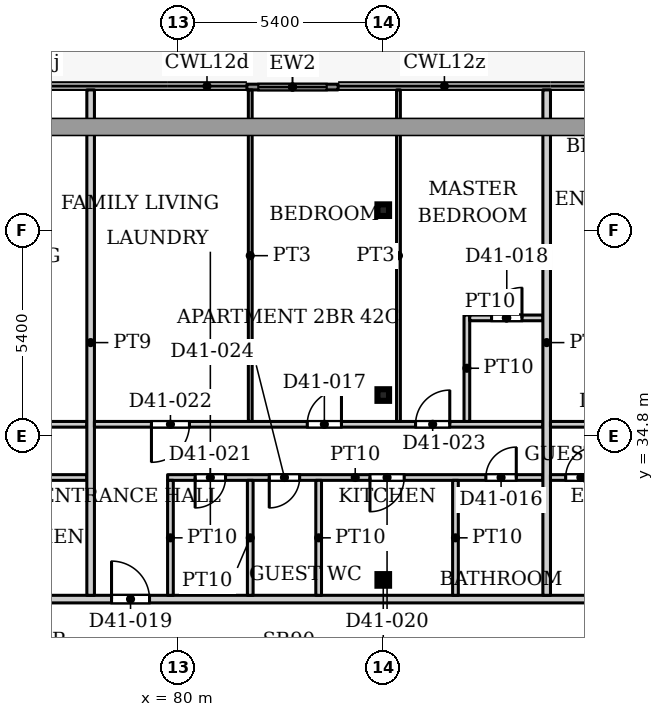
"""IFC4 building model, lengths in metres.
Left out: names, types, materials, properties, quantities, classifications, styles, units other than length and angle.
Written with IfcOpenShell. Run it as: python <this file> out.ifc"""

import sys

from ifc_helpers import new_model, si_unit, direction, frame, frame_2d, origin, origin_2d, place, context, subcontext, project, spatial, rectangle, hollow_rectangle, extrude, source, transform, mapped, element, fill, save


model = new_model("IFC4")
c1 = context("Model", 3, precision=1e-05, world=origin(), true_north=direction((0.0, 1.0)))
c2 = subcontext(c1, "Body", "Model", "MODEL_VIEW")
j1 = project(units=[si_unit("LENGTHUNIT", "METRE"), si_unit("PLANEANGLEUNIT", "RADIAN")], contexts=[c1])
p1 = place(None, origin())
s1 = spatial("IfcSite", under=j1, at=p1, CompositionType="ELEMENT")
p2 = place(p1, origin())
s2 = spatial("IfcBuilding", under=s1, at=p2, CompositionType="ELEMENT")
p3 = place(p2, frame((0.0, 0.0, 179.9)))
s3 = spatial("IfcBuildingStorey", under=s2, at=p3, CompositionType="ELEMENT", Elevation=179.9)
for number, where, z_axis, x_axis in (
    (1, (85.4, 31.005, 0.0), (0.0, 0.0, 1.0), (1.0, 0.0, 0.0)),
    (2, (85.4, 35.87, 0.0), (0.0, 0.0, 1.0), (1.0, 0.0, 0.0)),
    (3, (85.4, 40.735, 0.0), (0.0, 0.0, 1.0), (1.0, 0.0, 0.0)),
):
    element("IfcColumn", number, at=place(p3, frame(where, z_axis=z_axis, x_axis=x_axis)), inside=s3, PredefinedType="COLUMN", context=c2, shape_type="SweptSolid", body=[
        extrude(hollow_rectangle(XDim=0.305, YDim=0.305, WallThickness=0.016, InnerFilletRadius=0.016, OuterFilletRadius=0.032, at=origin_2d()), origin(), (0.0, 0.0, 1.0), 3.9),
    ])
p4 = place(p3, frame((81.812, 43.975, 0.0), z_axis=(0.0, 0.0, 1.0), x_axis=(1.0, 0.0, 0.0)))
e4 = element("IfcWall", 4, at=p4, inside=s3, PredefinedType="SOLIDWALL", context=c2, shape_type="SweptSolid", body=[
    extrude(rectangle(XDim=2.4, YDim=0.15, at=frame_2d((1.2, 0.0))), origin(), (0.0, 0.0, 1.0), 3.75),
])
p5 = place(p4, frame((0.3, 0.0, 0.0)))
e5 = element("IfcOpeningElement", 5, at=p5, cuts=e4, PredefinedType="OPENING", context=c2, shape_type="SweptSolid", body=[
    extrude(rectangle(XDim=1.8, YDim=2.4, at=frame_2d((0.9, 1.2))), frame((0.0, 0.085, 0.0), z_axis=(0.0, -1.0, 0.0), x_axis=(1.0, 0.0, 0.0)), (0.0, 0.0, 1.0), 0.17),
])
p6 = place(p3, frame((53.549, 30.5, 0.0), z_axis=(0.0, 0.0, 1.0), x_axis=(1.0, 0.0, 0.0)))
e6 = element("IfcWall", 6, at=p6, inside=s3, PredefinedType="PARTITIONING", context=c2, shape_type="SweptSolid", body=[
    extrude(rectangle(XDim=44.551, YDim=0.2, at=frame_2d((22.275, 0.0))), origin(), (0.0, 0.0, 1.0), 3.6),
])
p7 = place(p6, frame((6.851, 0.0, 0.0)))
e7 = element("IfcOpeningElement", 7, at=p7, cuts=e6, PredefinedType="OPENING", context=c2, shape_type="SweptSolid", body=[
    extrude(rectangle(XDim=1.0, YDim=2.1, at=frame_2d((0.5, 1.05))), frame((0.0, 0.11, 0.0), z_axis=(0.0, -1.0, 0.0), x_axis=(1.0, 0.0, 0.0)), (0.0, 0.0, 1.0), 0.22),
])
p8 = place(p6, frame((13.451, 0.0, 0.0)))
e8 = element("IfcOpeningElement", 8, at=p8, cuts=e6, PredefinedType="OPENING", context=c2, shape_type="SweptSolid", body=[
    extrude(rectangle(XDim=1.0, YDim=2.1, at=frame_2d((0.5, 1.05))), frame((0.0, 0.11, 0.0), z_axis=(0.0, -1.0, 0.0), x_axis=(1.0, 0.0, 0.0)), (0.0, 0.0, 1.0), 0.22),
])
p9 = place(p6, frame((24.701, 0.0, 0.0)))
e9 = element("IfcOpeningElement", 9, at=p9, cuts=e6, PredefinedType="OPENING", context=c2, shape_type="SweptSolid", body=[
    extrude(rectangle(XDim=1.0, YDim=2.1, at=frame_2d((0.5, 1.05))), frame((0.0, 0.11, 0.0), z_axis=(0.0, -1.0, 0.0), x_axis=(1.0, 0.0, 0.0)), (0.0, 0.0, 1.0), 0.22),
])
p10 = place(p6, frame((38.651, 0.0, 0.0)))
e10 = element("IfcOpeningElement", 10, at=p10, cuts=e6, PredefinedType="OPENING", context=c2, shape_type="SweptSolid", body=[
    extrude(rectangle(XDim=1.0, YDim=2.1, at=frame_2d((0.5, 1.05))), frame((0.0, 0.11, 0.0), z_axis=(0.0, -1.0, 0.0), x_axis=(1.0, 0.0, 0.0)), (0.0, 0.0, 1.0), 0.22),
])
p11 = place(p3, frame((63.4, 35.1, 0.0), z_axis=(0.0, 0.0, 1.0), x_axis=(1.0, 0.0, 0.0)))
e11 = element("IfcWall", 11, at=p11, inside=s3, PredefinedType="PARTITIONING", context=c2, shape_type="SweptSolid", body=[
    extrude(rectangle(XDim=14.2, YDim=0.15, at=frame_2d((7.1, 0.0))), origin(), (0.0, 0.0, 1.0), 3.6),
])
p12 = place(p11, frame((1.4, 0.0, 0.0)))
e12 = element("IfcOpeningElement", 12, at=p12, cuts=e11, PredefinedType="OPENING", context=c2, shape_type="SweptSolid", body=[
    extrude(rectangle(XDim=0.9, YDim=2.1, at=frame_2d((0.45, 1.05))), frame((0.0, 0.085, 0.0), z_axis=(0.0, -1.0, 0.0), x_axis=(1.0, 0.0, 0.0)), (0.0, 0.0, 1.0), 0.17),
])
p13 = place(p11, frame((10.95, 0.0, 0.0)))
e13 = element("IfcOpeningElement", 13, at=p13, cuts=e11, PredefinedType="OPENING", context=c2, shape_type="SweptSolid", body=[
    extrude(rectangle(XDim=1.0, YDim=2.1, at=frame_2d((0.5, 1.05))), frame((0.0, 0.085, 0.0), z_axis=(0.0, -1.0, 0.0), x_axis=(1.0, 0.0, 0.0)), (0.0, 0.0, 1.0), 0.17),
])
p14 = place(p11, frame((6.8, 0.0, 0.0)))
e14 = element("IfcOpeningElement", 14, at=p14, cuts=e11, PredefinedType="OPENING", context=c2, shape_type="SweptSolid", body=[
    extrude(rectangle(XDim=0.9, YDim=2.1, at=frame_2d((0.45, 1.05))), frame((0.0, 0.085, 0.0), z_axis=(0.0, -1.0, 0.0), x_axis=(1.0, 0.0, 0.0)), (0.0, 0.0, 1.0), 0.17),
])
p15 = place(p3, frame((69.525, 33.7, 0.0), z_axis=(0.0, 0.0, 1.0), x_axis=(1.0, 0.0, 0.0)))
e15 = element("IfcWall", 15, at=p15, inside=s3, PredefinedType="PARTITIONING", context=c2, shape_type="SweptSolid", body=[
    extrude(rectangle(XDim=8.075, YDim=0.15, at=frame_2d((4.038, 0.0))), origin(), (0.0, 0.0, 1.0), 3.6),
])
p16 = place(p15, frame((4.625, 0.0, 0.0)))
e16 = element("IfcOpeningElement", 16, at=p16, cuts=e15, PredefinedType="OPENING", context=c2, shape_type="SweptSolid", body=[
    extrude(rectangle(XDim=0.9, YDim=2.1, at=frame_2d((0.45, 1.05))), frame((0.0, 0.085, 0.0), z_axis=(0.0, -1.0, 0.0), x_axis=(1.0, 0.0, 0.0)), (0.0, 0.0, 1.0), 0.17),
])
p17 = place(p15, frame((1.175, 0.0, 0.0)))
e17 = element("IfcOpeningElement", 17, at=p17, cuts=e15, PredefinedType="OPENING", context=c2, shape_type="SweptSolid", body=[
    extrude(rectangle(XDim=0.8, YDim=2.1, at=frame_2d((0.4, 1.05))), frame((0.0, 0.085, 0.0), z_axis=(0.0, -1.0, 0.0), x_axis=(1.0, 0.0, 0.0)), (0.0, 0.0, 1.0), 0.17),
])
p18 = place(p3, frame((77.7, 30.6, 0.0), z_axis=(0.0, 0.0, 1.0), x_axis=(0.0, 1.0, 0.0)))
e18 = element("IfcWall", 18, at=p18, inside=s3, PredefinedType="PARTITIONING", context=c2, shape_type="SweptSolid", body=[
    extrude(rectangle(XDim=13.3, YDim=0.2, at=frame_2d((6.65, 0.0))), origin(), (0.0, 0.0, 1.0), 3.6),
])
p19 = place(p3, frame((77.8, 35.1, 0.0), z_axis=(0.0, 0.0, 1.0), x_axis=(1.0, 0.0, 0.0)))
e19 = element("IfcWall", 19, at=p19, inside=s3, PredefinedType="PARTITIONING", context=c2, shape_type="SweptSolid", body=[
    extrude(rectangle(XDim=11.8, YDim=0.15, at=frame_2d((5.9, 0.0))), origin(), (0.0, 0.0, 1.0), 3.6),
])
p20 = place(p19, frame((5.6, 0.0, 0.0)))
e20 = element("IfcOpeningElement", 20, at=p20, cuts=e19, PredefinedType="OPENING", context=c2, shape_type="SweptSolid", body=[
    extrude(rectangle(XDim=0.9, YDim=2.1, at=frame_2d((0.45, 1.05))), frame((0.0, 0.085, 0.0), z_axis=(0.0, -1.0, 0.0), x_axis=(1.0, 0.0, 0.0)), (0.0, 0.0, 1.0), 0.17),
])
p21 = place(p19, frame((1.5, 0.0, 0.0)))
e21 = element("IfcOpeningElement", 21, at=p21, cuts=e19, PredefinedType="OPENING", context=c2, shape_type="SweptSolid", body=[
    extrude(rectangle(XDim=1.0, YDim=2.1, at=frame_2d((0.5, 1.05))), frame((0.0, 0.085, 0.0), z_axis=(0.0, -1.0, 0.0), x_axis=(1.0, 0.0, 0.0)), (0.0, 0.0, 1.0), 0.17),
])
p22 = place(p19, frame((8.45, 0.0, 0.0)))
e22 = element("IfcOpeningElement", 22, at=p22, cuts=e19, PredefinedType="OPENING", context=c2, shape_type="SweptSolid", body=[
    extrude(rectangle(XDim=0.9, YDim=2.1, at=frame_2d((0.45, 1.05))), frame((0.0, 0.085, 0.0), z_axis=(0.0, -1.0, 0.0), x_axis=(1.0, 0.0, 0.0)), (0.0, 0.0, 1.0), 0.17),
])
p23 = place(p3, frame((79.725, 33.7, 0.0), z_axis=(0.0, 0.0, 1.0), x_axis=(1.0, 0.0, 0.0)))
e23 = element("IfcWall", 23, at=p23, inside=s3, PredefinedType="PARTITIONING", context=c2, shape_type="SweptSolid", body=[
    extrude(rectangle(XDim=9.875, YDim=0.15, at=frame_2d((4.938, 0.0))), origin(), (0.0, 0.0, 1.0), 3.6),
])
p24 = place(p23, frame((8.375, 0.0, 0.0)))
e24 = element("IfcOpeningElement", 24, at=p24, cuts=e23, PredefinedType="OPENING", context=c2, shape_type="SweptSolid", body=[
    extrude(rectangle(XDim=0.8, YDim=2.1, at=frame_2d((0.4, 1.05))), frame((0.0, 0.085, 0.0), z_axis=(0.0, -1.0, 0.0), x_axis=(1.0, 0.0, 0.0)), (0.0, 0.0, 1.0), 0.17),
])
p25 = place(p23, frame((5.325, 0.0, 0.0)))
e25 = element("IfcOpeningElement", 25, at=p25, cuts=e23, PredefinedType="OPENING", context=c2, shape_type="SweptSolid", body=[
    extrude(rectangle(XDim=0.9, YDim=2.1, at=frame_2d((0.45, 1.05))), frame((0.0, 0.085, 0.0), z_axis=(0.0, -1.0, 0.0), x_axis=(1.0, 0.0, 0.0)), (0.0, 0.0, 1.0), 0.17),
])
p26 = place(p23, frame((0.725, 0.0, 0.0)))
e26 = element("IfcOpeningElement", 26, at=p26, cuts=e23, PredefinedType="OPENING", context=c2, shape_type="SweptSolid", body=[
    extrude(rectangle(XDim=0.8, YDim=2.1, at=frame_2d((0.4, 1.05))), frame((0.0, 0.085, 0.0), z_axis=(0.0, -1.0, 0.0), x_axis=(1.0, 0.0, 0.0)), (0.0, 0.0, 1.0), 0.17),
])
p27 = place(p23, frame((2.675, 0.0, 0.0)))
e27 = element("IfcOpeningElement", 27, at=p27, cuts=e23, PredefinedType="OPENING", context=c2, shape_type="SweptSolid", body=[
    extrude(rectangle(XDim=0.8, YDim=2.1, at=frame_2d((0.4, 1.05))), frame((0.0, 0.085, 0.0), z_axis=(0.0, -1.0, 0.0), x_axis=(1.0, 0.0, 0.0)), (0.0, 0.0, 1.0), 0.17),
])
for number, where, z_axis, x_axis in (
    (28, (79.8, 30.6, 0.0), (0.0, 0.0, 1.0), (0.0, 1.0, 0.0)),
    (29, (81.9, 30.6, 0.0), (0.0, 0.0, 1.0), (0.0, 1.0, 0.0)),
):
    element("IfcWall", number, at=place(p3, frame(where, z_axis=z_axis, x_axis=x_axis)), inside=s3, PredefinedType="PARTITIONING", context=c2, shape_type="SweptSolid", body=[
        extrude(rectangle(XDim=3.025, YDim=0.15, at=frame_2d((1.512, 0.0))), origin(), (0.0, 0.0, 1.0), 3.6),
    ])
p28 = place(p3, frame((81.9, 35.175, 0.0), z_axis=(0.0, 0.0, 1.0), x_axis=(0.0, 1.0, 0.0)))
e30 = element("IfcWall", 30, at=p28, inside=s3, PredefinedType="PARTITIONING", context=c2, shape_type="SweptSolid", body=[
    extrude(rectangle(XDim=8.725, YDim=0.1, at=frame_2d((4.362, 0.0))), origin(), (0.0, 0.0, 1.0), 3.6),
])
p29 = place(p3, frame((83.7, 30.6, 0.0), z_axis=(0.0, 0.0, 1.0), x_axis=(0.0, 1.0, 0.0)))
e31 = element("IfcWall", 31, at=p29, inside=s3, PredefinedType="PARTITIONING", context=c2, shape_type="SweptSolid", body=[
    extrude(rectangle(XDim=3.025, YDim=0.15, at=frame_2d((1.512, 0.0))), origin(), (0.0, 0.0, 1.0), 3.6),
])
p30 = place(p3, frame((85.8, 35.175, 0.0), z_axis=(0.0, 0.0, 1.0), x_axis=(0.0, 1.0, 0.0)))
e32 = element("IfcWall", 32, at=p30, inside=s3, PredefinedType="PARTITIONING", context=c2, shape_type="SweptSolid", body=[
    extrude(rectangle(XDim=8.725, YDim=0.1, at=frame_2d((4.362, 0.0))), origin(), (0.0, 0.0, 1.0), 3.6),
])
p31 = place(p3, frame((87.3, 30.6, 0.0), z_axis=(0.0, 0.0, 1.0), x_axis=(0.0, 1.0, 0.0)))
e33 = element("IfcWall", 33, at=p31, inside=s3, PredefinedType="PARTITIONING", context=c2, shape_type="SweptSolid", body=[
    extrude(rectangle(XDim=3.025, YDim=0.15, at=frame_2d((1.512, 0.0))), origin(), (0.0, 0.0, 1.0), 3.6),
])
p32 = place(p3, frame((87.6, 35.175, 0.0), z_axis=(0.0, 0.0, 1.0), x_axis=(0.0, 1.0, 0.0)))
e34 = element("IfcWall", 34, at=p32, inside=s3, PredefinedType="PARTITIONING", context=c2, shape_type="SweptSolid", body=[
    extrude(rectangle(XDim=2.8, YDim=0.15, at=frame_2d((1.4, 0.0))), origin(), (0.0, 0.0, 1.0), 3.6),
])
p33 = place(p3, frame((87.675, 37.9, 0.0), z_axis=(0.0, 0.0, 1.0), x_axis=(1.0, 0.0, 0.0)))
e35 = element("IfcWall", 35, at=p33, inside=s3, PredefinedType="PARTITIONING", context=c2, shape_type="SweptSolid", body=[
    extrude(rectangle(XDim=1.925, YDim=0.15, at=frame_2d((0.962, 0.0))), origin(), (0.0, 0.0, 1.0), 3.6),
])
p34 = place(p33, frame((0.575, 0.0, 0.0)))
e36 = element("IfcOpeningElement", 36, at=p34, cuts=e35, PredefinedType="OPENING", context=c2, shape_type="SweptSolid", body=[
    extrude(rectangle(XDim=0.8, YDim=2.1, at=frame_2d((0.4, 1.05))), frame((0.0, 0.085, 0.0), z_axis=(0.0, -1.0, 0.0), x_axis=(1.0, 0.0, 0.0)), (0.0, 0.0, 1.0), 0.17),
])
p35 = place(p3, frame((89.7, 30.6, 0.0), z_axis=(0.0, 0.0, 1.0), x_axis=(0.0, 1.0, 0.0)))
e37 = element("IfcWall", 37, at=p35, inside=s3, PredefinedType="PARTITIONING", context=c2, shape_type="SweptSolid", body=[
    extrude(rectangle(XDim=13.3, YDim=0.2, at=frame_2d((6.65, 0.0))), origin(), (0.0, 0.0, 1.0), 3.6),
])
p36 = place(p3, frame((89.8, 33.7, 0.0), z_axis=(0.0, 0.0, 1.0), x_axis=(1.0, 0.0, 0.0)))
e38 = element("IfcWall", 38, at=p36, inside=s3, PredefinedType="PARTITIONING", context=c2, shape_type="SweptSolid", body=[
    extrude(rectangle(XDim=1.625, YDim=0.15, at=frame_2d((0.812, 0.0))), origin(), (0.0, 0.0, 1.0), 3.6),
])
p37 = place(p36, frame((0.4, 0.0, 0.0)))
e39 = element("IfcOpeningElement", 39, at=p37, cuts=e38, PredefinedType="OPENING", context=c2, shape_type="SweptSolid", body=[
    extrude(rectangle(XDim=0.8, YDim=2.1, at=frame_2d((0.4, 1.05))), frame((0.0, 0.085, 0.0), z_axis=(0.0, -1.0, 0.0), x_axis=(1.0, 0.0, 0.0)), (0.0, 0.0, 1.0), 0.17),
])
p38 = place(p3, frame((89.8, 35.1, 0.0), z_axis=(0.0, 0.0, 1.0), x_axis=(1.0, 0.0, 0.0)))
e40 = element("IfcWall", 40, at=p38, inside=s3, PredefinedType="PARTITIONING", context=c2, shape_type="SweptSolid", body=[
    extrude(rectangle(XDim=10.1, YDim=0.15, at=frame_2d((5.05, 0.0))), origin(), (0.0, 0.0, 1.0), 3.6),
])
p39 = place(p38, frame((1.4, 0.0, 0.0)))
e41 = element("IfcOpeningElement", 41, at=p39, cuts=e40, PredefinedType="OPENING", context=c2, shape_type="SweptSolid", body=[
    extrude(rectangle(XDim=0.9, YDim=2.1, at=frame_2d((0.45, 1.05))), frame((0.0, 0.085, 0.0), z_axis=(0.0, -1.0, 0.0), x_axis=(1.0, 0.0, 0.0)), (0.0, 0.0, 1.0), 0.17),
])
p40 = place(p38, frame((6.45, 0.0, 0.0)))
e42 = element("IfcOpeningElement", 42, at=p40, cuts=e40, PredefinedType="OPENING", context=c2, shape_type="SweptSolid", body=[
    extrude(rectangle(XDim=1.0, YDim=2.1, at=frame_2d((0.5, 1.05))), frame((0.0, 0.085, 0.0), z_axis=(0.0, -1.0, 0.0), x_axis=(1.0, 0.0, 0.0)), (0.0, 0.0, 1.0), 0.17),
])
m1 = source(origin(), c2, "Body", "SweptSolid", [
    extrude(rectangle(XDim=1.8, YDim=2.4, at=frame_2d((0.9, 1.2))), frame((0.0, 0.025, 0.0), z_axis=(0.0, -1.0, 0.0), x_axis=(1.0, 0.0, 0.0)), (0.0, 0.0, 1.0), 0.05),
])
p41 = place(p5, origin())
e43 = element("IfcDoor", 43, at=p41, inside=s3, OperationType="SLIDING_TO_LEFT", PredefinedType="DOOR", context=c2, shape_type="MappedRepresentation", body=[
    mapped(m1, transform((0.0, 0.0, 0.0), x_axis=(1.0, 0.0, 0.0), y_axis=(0.0, 1.0, 0.0), z_axis=(0.0, 0.0, 1.0), scale=1.0)),
])
fill(e5, e43)
m2 = source(origin(), c2, "Body", "SweptSolid", [
    extrude(rectangle(XDim=0.8, YDim=2.1, at=frame_2d((0.4, 1.05))), frame((0.0, 0.025, 0.0), z_axis=(0.0, -1.0, 0.0), x_axis=(1.0, 0.0, 0.0)), (0.0, 0.0, 1.0), 0.05),
])
p42 = place(p24, origin())
e44 = element("IfcDoor", 44, at=p42, inside=s3, OperationType="SINGLE_SWING_LEFT", PredefinedType="DOOR", context=c2, shape_type="MappedRepresentation", body=[
    mapped(m2, transform((0.0, 0.0, 0.0), x_axis=(1.0, 0.0, 0.0), y_axis=(0.0, 1.0, 0.0), z_axis=(0.0, 0.0, 1.0), scale=1.0)),
])
fill(e24, e44)
m3 = source(origin(), c2, "Body", "SweptSolid", [
    extrude(rectangle(XDim=0.9, YDim=2.1, at=frame_2d((0.45, 1.05))), frame((0.0, 0.025, 0.0), z_axis=(0.0, -1.0, 0.0), x_axis=(1.0, 0.0, 0.0)), (0.0, 0.0, 1.0), 0.05),
])
p43 = place(p20, origin())
e45 = element("IfcDoor", 45, at=p43, inside=s3, OperationType="SINGLE_SWING_LEFT", PredefinedType="DOOR", context=c2, shape_type="MappedRepresentation", body=[
    mapped(m3, transform((0.0, 0.0, 0.0), x_axis=(1.0, 0.0, 0.0), y_axis=(0.0, 1.0, 0.0), z_axis=(0.0, 0.0, 1.0), scale=1.0)),
])
fill(e20, e45)
p44 = place(p34, origin())
e46 = element("IfcDoor", 46, at=p44, inside=s3, OperationType="SINGLE_SWING_LEFT", PredefinedType="DOOR", context=c2, shape_type="MappedRepresentation", body=[
    mapped(m2, transform((0.0, 0.0, 0.0), x_axis=(1.0, 0.0, 0.0), y_axis=(0.0, 1.0, 0.0), z_axis=(0.0, 0.0, 1.0), scale=1.0)),
])
fill(e36, e46)
m4 = source(origin(), c2, "Body", "SweptSolid", [
    extrude(rectangle(XDim=1.0, YDim=2.1, at=frame_2d((0.5, 1.05))), frame((0.0, 0.025, 0.0), z_axis=(0.0, -1.0, 0.0), x_axis=(1.0, 0.0, 0.0)), (0.0, 0.0, 1.0), 0.05),
])
p45 = place(p9, origin())
e47 = element("IfcDoor", 47, at=p45, inside=s3, OperationType="SINGLE_SWING_LEFT", PredefinedType="DOOR", context=c2, shape_type="MappedRepresentation", body=[
    mapped(m4, transform((0.0, 0.0, 0.0), x_axis=(1.0, 0.0, 0.0), y_axis=(0.0, 1.0, 0.0), z_axis=(0.0, 0.0, 1.0), scale=1.0)),
])
fill(e9, e47)
p46 = place(p25, origin())
e48 = element("IfcDoor", 48, at=p46, inside=s3, OperationType="SINGLE_SWING_RIGHT", PredefinedType="DOOR", context=c2, shape_type="MappedRepresentation", body=[
    mapped(m3, transform((0.0, 0.0, 0.0), x_axis=(1.0, 0.0, 0.0), y_axis=(0.0, 1.0, 0.0), z_axis=(0.0, 0.0, 1.0), scale=1.0)),
])
fill(e25, e48)
p47 = place(p26, origin())
e49 = element("IfcDoor", 49, at=p47, inside=s3, OperationType="SINGLE_SWING_RIGHT", PredefinedType="DOOR", context=c2, shape_type="MappedRepresentation", body=[
    mapped(m2, transform((0.0, 0.0, 0.0), x_axis=(1.0, 0.0, 0.0), y_axis=(0.0, 1.0, 0.0), z_axis=(0.0, 0.0, 1.0), scale=1.0)),
])
fill(e26, e49)
m5 = source(origin(), c2, "Body", "SweptSolid", [
    extrude(rectangle(XDim=1.0, YDim=2.1, at=frame_2d((0.5, 1.05))), frame((0.0, 0.025, 0.0), z_axis=(0.0, -1.0, 0.0), x_axis=(1.0, 0.0, 0.0)), (0.0, 0.0, 1.0), 0.05),
])
p48 = place(p21, origin())
e50 = element("IfcDoor", 50, at=p48, inside=s3, OperationType="SINGLE_SWING_RIGHT", PredefinedType="DOOR", context=c2, shape_type="MappedRepresentation", body=[
    mapped(m5, transform((0.0, 0.0, 0.0), x_axis=(1.0, 0.0, 0.0), y_axis=(0.0, 1.0, 0.0), z_axis=(0.0, 0.0, 1.0), scale=1.0)),
])
fill(e21, e50)
p49 = place(p22, origin())
e51 = element("IfcDoor", 51, at=p49, inside=s3, OperationType="SINGLE_SWING_LEFT", PredefinedType="DOOR", context=c2, shape_type="MappedRepresentation", body=[
    mapped(m3, transform((0.0, 0.0, 0.0), x_axis=(1.0, 0.0, 0.0), y_axis=(0.0, 1.0, 0.0), z_axis=(0.0, 0.0, 1.0), scale=1.0)),
])
fill(e22, e51)
p50 = place(p27, origin())
e52 = element("IfcDoor", 52, at=p50, inside=s3, OperationType="SINGLE_SWING_RIGHT", PredefinedType="DOOR", context=c2, shape_type="MappedRepresentation", body=[
    mapped(m2, transform((0.0, 0.0, 0.0), x_axis=(1.0, 0.0, 0.0), y_axis=(0.0, 1.0, 0.0), z_axis=(0.0, 0.0, 1.0), scale=1.0)),
])
fill(e27, e52)
p51 = place(p37, origin())
e53 = element("IfcDoor", 53, at=p51, inside=s3, OperationType="SINGLE_SWING_LEFT", PredefinedType="DOOR", context=c2, shape_type="MappedRepresentation", body=[
    mapped(m2, transform((0.0, 0.0, 0.0), x_axis=(1.0, 0.0, 0.0), y_axis=(0.0, 1.0, 0.0), z_axis=(0.0, 0.0, 1.0), scale=1.0)),
])
fill(e39, e53)
save(model, sys.argv[1])
